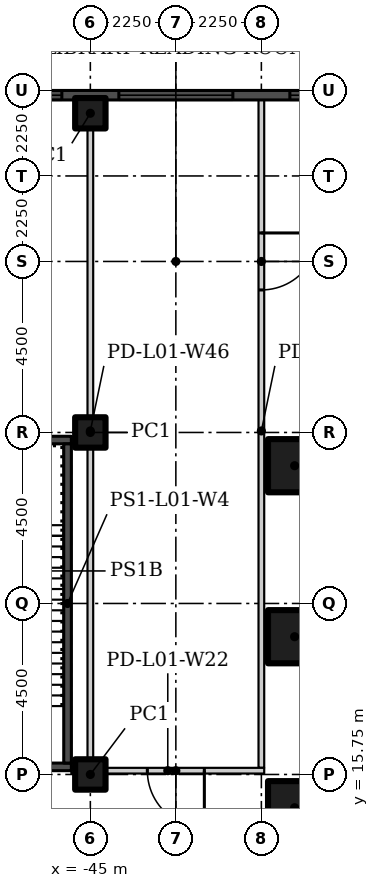
"""IFC4 building model, lengths in metres.
Left out: names, types, materials, properties, quantities, classifications, styles, units other than length and angle.
Written with IfcOpenShell. Run it as: python <this file> out.ifc"""

import sys

from ifc_helpers import new_model, si_unit, direction, frame, frame_2d, origin, origin_2d, place, context, subcontext, project, spatial, rectangle, hollow_rectangle, extrude, element, fill, save


model = new_model("IFC4")
c1 = context("Model", 3, precision=1e-05, world=origin(), true_north=direction((0.0, 1.0)))
c2 = subcontext(c1, "Body", "Model", "MODEL_VIEW")
j1 = project(units=[si_unit("LENGTHUNIT", "METRE"), si_unit("PLANEANGLEUNIT", "RADIAN")], contexts=[c1])
p1 = place(None, origin())
s1 = spatial("IfcSite", under=j1, at=p1, CompositionType="ELEMENT")
p2 = place(p1, origin())
s2 = spatial("IfcBuilding", under=s1, at=p2, CompositionType="ELEMENT")
p3 = place(p2, frame((0.0, 0.0, 6.5)))
s3 = spatial("IfcBuildingStorey", under=s2, at=p3, CompositionType="ELEMENT", Elevation=6.5)
for number, where in (
    (1, (-39.625, 14.875, 0.0)),
    (2, (-39.625, 19.375, 0.0)),
    (3, (-39.625, 23.875, 0.0)),
):
    element("IfcColumn", number, at=place(p3, frame(where)), inside=s3, PredefinedType="COLUMN", context=c2, shape_type="SweptSolid", body=[
        extrude(hollow_rectangle(XDim=1.4, YDim=1.4, WallThickness=0.06, at=origin_2d()), origin(), (0.0, 0.0, 1.0), 5.6),
    ])
for number, where in (
    (4, (-45.0, 15.75, 0.0)),
    (5, (-45.0, 24.75, 0.0)),
    (6, (-45.0, 33.15, 0.0)),
):
    element("IfcColumn", number, at=place(p3, frame(where)), inside=s3, PredefinedType="COLUMN", context=c2, shape_type="SweptSolid", body=[
        extrude(hollow_rectangle(XDim=0.8, YDim=0.8, WallThickness=0.03, at=origin_2d()), origin(), (0.0, 0.0, 1.0), 5.6),
    ])
p4 = place(p3, frame((-40.5, 33.655, 0.0), z_axis=(0.0, 0.0, 1.0), x_axis=(0.0, -1.0, 0.0)))
e7 = element("IfcWall", 7, at=p4, inside=s3, PredefinedType="PARTITIONING", context=c2, shape_type="SweptSolid", body=[
    extrude(rectangle(XDim=17.73, YDim=0.15, at=frame_2d((8.865, 0.0))), origin(), (0.0, 0.0, 1.0), 5.6),
])
p5 = place(p4, frame((3.655, 0.0, 0.0)))
e8 = element("IfcOpeningElement", 8, at=p5, cuts=e7, PredefinedType="OPENING", context=c2, shape_type="SweptSolid", body=[
    extrude(rectangle(XDim=1.5, YDim=2.1, at=frame_2d((0.75, 1.05))), frame((0.0, 0.085, 0.0), z_axis=(0.0, -1.0, 0.0), x_axis=(1.0, 0.0, 0.0)), (0.0, 0.0, 1.0), 0.17),
])
p6 = place(p3, frame((-40.425, 15.85, 0.0), z_axis=(0.0, 0.0, 1.0), x_axis=(-1.0, 0.0, 0.0)))
e9 = element("IfcWall", 9, at=p6, inside=s3, PredefinedType="PARTITIONING", context=c2, shape_type="SweptSolid", body=[
    extrude(rectangle(XDim=5.075, YDim=0.15, at=frame_2d((2.538, 0.0))), origin(), (0.0, 0.0, 1.0), 5.6),
])
p7 = place(p6, frame((1.575, 0.0, 0.0)))
e10 = element("IfcOpeningElement", 10, at=p7, cuts=e9, PredefinedType="OPENING", context=c2, shape_type="SweptSolid", body=[
    extrude(rectangle(XDim=1.5, YDim=2.1, at=frame_2d((0.75, 1.05))), frame((0.0, 0.085, 0.0), z_axis=(0.0, -1.0, 0.0), x_axis=(1.0, 0.0, 0.0)), (0.0, 0.0, 1.0), 0.17),
])
p8 = place(p3, frame((-45.0, 15.925, 0.0), z_axis=(0.0, 0.0, 1.0), x_axis=(0.0, 1.0, 0.0)))
e11 = element("IfcWall", 11, at=p8, inside=s3, PredefinedType="PARTITIONING", context=c2, shape_type="SweptSolid", body=[
    extrude(rectangle(XDim=17.73, YDim=0.15, at=frame_2d((8.865, 0.0))), origin(), (0.0, 0.0, 1.0), 5.6),
])
p9 = place(p3, frame((-67.5, 33.625, -0.35)))
e12 = element("IfcWall", 12, at=p9, inside=s3, PredefinedType="SOLIDWALL", context=c2, shape_type="SweptSolid", body=[
    extrude(rectangle(XDim=130.5, YDim=0.25, at=frame_2d((65.25, 0.0))), origin(), (0.0, 0.0, 1.0), 6.0),
])
p10 = place(p9, frame((126.75, 0.0, 1.35)))
e13 = element("IfcOpeningElement", 13, at=p10, cuts=e12, PredefinedType="OPENING", context=c2, shape_type="SweptSolid", body=[
    extrude(rectangle(XDim=3.0, YDim=1.8, at=frame_2d((1.5, 0.9))), frame((0.0, 0.135, 0.0), z_axis=(0.0, -1.0, 0.0), x_axis=(1.0, 0.0, 0.0)), (0.0, 0.0, 1.0), 0.27),
])
p11 = place(p9, frame((122.25, 0.0, 1.35)))
e14 = element("IfcOpeningElement", 14, at=p11, cuts=e12, PredefinedType="OPENING", context=c2, shape_type="SweptSolid", body=[
    extrude(rectangle(XDim=3.0, YDim=1.8, at=frame_2d((1.5, 0.9))), frame((0.0, 0.135, 0.0), z_axis=(0.0, -1.0, 0.0), x_axis=(1.0, 0.0, 0.0)), (0.0, 0.0, 1.0), 0.27),
])
p12 = place(p9, frame((117.75, 0.0, 1.35)))
e15 = element("IfcOpeningElement", 15, at=p12, cuts=e12, PredefinedType="OPENING", context=c2, shape_type="SweptSolid", body=[
    extrude(rectangle(XDim=3.0, YDim=1.8, at=frame_2d((1.5, 0.9))), frame((0.0, 0.135, 0.0), z_axis=(0.0, -1.0, 0.0), x_axis=(1.0, 0.0, 0.0)), (0.0, 0.0, 1.0), 0.27),
])
p13 = place(p9, frame((113.25, 0.0, 1.35)))
e16 = element("IfcOpeningElement", 16, at=p13, cuts=e12, PredefinedType="OPENING", context=c2, shape_type="SweptSolid", body=[
    extrude(rectangle(XDim=3.0, YDim=1.8, at=frame_2d((1.5, 0.9))), frame((0.0, 0.135, 0.0), z_axis=(0.0, -1.0, 0.0), x_axis=(1.0, 0.0, 0.0)), (0.0, 0.0, 1.0), 0.27),
])
p14 = place(p9, frame((108.75, 0.0, 1.35)))
e17 = element("IfcOpeningElement", 17, at=p14, cuts=e12, PredefinedType="OPENING", context=c2, shape_type="SweptSolid", body=[
    extrude(rectangle(XDim=3.0, YDim=1.8, at=frame_2d((1.5, 0.9))), frame((0.0, 0.135, 0.0), z_axis=(0.0, -1.0, 0.0), x_axis=(1.0, 0.0, 0.0)), (0.0, 0.0, 1.0), 0.27),
])
p15 = place(p9, frame((104.25, 0.0, 1.35)))
e18 = element("IfcOpeningElement", 18, at=p15, cuts=e12, PredefinedType="OPENING", context=c2, shape_type="SweptSolid", body=[
    extrude(rectangle(XDim=3.0, YDim=1.8, at=frame_2d((1.5, 0.9))), frame((0.0, 0.135, 0.0), z_axis=(0.0, -1.0, 0.0), x_axis=(1.0, 0.0, 0.0)), (0.0, 0.0, 1.0), 0.27),
])
p16 = place(p9, frame((99.75, 0.0, 1.35)))
e19 = element("IfcOpeningElement", 19, at=p16, cuts=e12, PredefinedType="OPENING", context=c2, shape_type="SweptSolid", body=[
    extrude(rectangle(XDim=3.0, YDim=1.8, at=frame_2d((1.5, 0.9))), frame((0.0, 0.135, 0.0), z_axis=(0.0, -1.0, 0.0), x_axis=(1.0, 0.0, 0.0)), (0.0, 0.0, 1.0), 0.27),
])
p17 = place(p9, frame((95.25, 0.0, 1.35)))
e20 = element("IfcOpeningElement", 20, at=p17, cuts=e12, PredefinedType="OPENING", context=c2, shape_type="SweptSolid", body=[
    extrude(rectangle(XDim=3.0, YDim=1.8, at=frame_2d((1.5, 0.9))), frame((0.0, 0.135, 0.0), z_axis=(0.0, -1.0, 0.0), x_axis=(1.0, 0.0, 0.0)), (0.0, 0.0, 1.0), 0.27),
])
p18 = place(p9, frame((90.75, 0.0, 1.35)))
e21 = element("IfcOpeningElement", 21, at=p18, cuts=e12, PredefinedType="OPENING", context=c2, shape_type="SweptSolid", body=[
    extrude(rectangle(XDim=3.0, YDim=1.8, at=frame_2d((1.5, 0.9))), frame((0.0, 0.135, 0.0), z_axis=(0.0, -1.0, 0.0), x_axis=(1.0, 0.0, 0.0)), (0.0, 0.0, 1.0), 0.27),
])
p19 = place(p9, frame((86.25, 0.0, 1.35)))
e22 = element("IfcOpeningElement", 22, at=p19, cuts=e12, PredefinedType="OPENING", context=c2, shape_type="SweptSolid", body=[
    extrude(rectangle(XDim=3.0, YDim=1.8, at=frame_2d((1.5, 0.9))), frame((0.0, 0.135, 0.0), z_axis=(0.0, -1.0, 0.0), x_axis=(1.0, 0.0, 0.0)), (0.0, 0.0, 1.0), 0.27),
])
p20 = place(p9, frame((81.75, 0.0, 1.35)))
e23 = element("IfcOpeningElement", 23, at=p20, cuts=e12, PredefinedType="OPENING", context=c2, shape_type="SweptSolid", body=[
    extrude(rectangle(XDim=3.0, YDim=1.8, at=frame_2d((1.5, 0.9))), frame((0.0, 0.135, 0.0), z_axis=(0.0, -1.0, 0.0), x_axis=(1.0, 0.0, 0.0)), (0.0, 0.0, 1.0), 0.27),
])
p21 = place(p9, frame((77.25, 0.0, 1.35)))
e24 = element("IfcOpeningElement", 24, at=p21, cuts=e12, PredefinedType="OPENING", context=c2, shape_type="SweptSolid", body=[
    extrude(rectangle(XDim=3.0, YDim=1.8, at=frame_2d((1.5, 0.9))), frame((0.0, 0.135, 0.0), z_axis=(0.0, -1.0, 0.0), x_axis=(1.0, 0.0, 0.0)), (0.0, 0.0, 1.0), 0.27),
])
p22 = place(p9, frame((72.75, 0.0, 1.35)))
e25 = element("IfcOpeningElement", 25, at=p22, cuts=e12, PredefinedType="OPENING", context=c2, shape_type="SweptSolid", body=[
    extrude(rectangle(XDim=3.0, YDim=1.8, at=frame_2d((1.5, 0.9))), frame((0.0, 0.135, 0.0), z_axis=(0.0, -1.0, 0.0), x_axis=(1.0, 0.0, 0.0)), (0.0, 0.0, 1.0), 0.27),
])
p23 = place(p9, frame((68.25, 0.0, 1.35)))
e26 = element("IfcOpeningElement", 26, at=p23, cuts=e12, PredefinedType="OPENING", context=c2, shape_type="SweptSolid", body=[
    extrude(rectangle(XDim=3.0, YDim=1.8, at=frame_2d((1.5, 0.9))), frame((0.0, 0.135, 0.0), z_axis=(0.0, -1.0, 0.0), x_axis=(1.0, 0.0, 0.0)), (0.0, 0.0, 1.0), 0.27),
])
p24 = place(p9, frame((63.75, 0.0, 1.35)))
e27 = element("IfcOpeningElement", 27, at=p24, cuts=e12, PredefinedType="OPENING", context=c2, shape_type="SweptSolid", body=[
    extrude(rectangle(XDim=3.0, YDim=1.8, at=frame_2d((1.5, 0.9))), frame((0.0, 0.135, 0.0), z_axis=(0.0, -1.0, 0.0), x_axis=(1.0, 0.0, 0.0)), (0.0, 0.0, 1.0), 0.27),
])
p25 = place(p9, frame((59.25, 0.0, 1.35)))
e28 = element("IfcOpeningElement", 28, at=p25, cuts=e12, PredefinedType="OPENING", context=c2, shape_type="SweptSolid", body=[
    extrude(rectangle(XDim=3.0, YDim=1.8, at=frame_2d((1.5, 0.9))), frame((0.0, 0.135, 0.0), z_axis=(0.0, -1.0, 0.0), x_axis=(1.0, 0.0, 0.0)), (0.0, 0.0, 1.0), 0.27),
])
p26 = place(p9, frame((54.75, 0.0, 1.35)))
e29 = element("IfcOpeningElement", 29, at=p26, cuts=e12, PredefinedType="OPENING", context=c2, shape_type="SweptSolid", body=[
    extrude(rectangle(XDim=3.0, YDim=1.8, at=frame_2d((1.5, 0.9))), frame((0.0, 0.135, 0.0), z_axis=(0.0, -1.0, 0.0), x_axis=(1.0, 0.0, 0.0)), (0.0, 0.0, 1.0), 0.27),
])
p27 = place(p9, frame((50.25, 0.0, 1.35)))
e30 = element("IfcOpeningElement", 30, at=p27, cuts=e12, PredefinedType="OPENING", context=c2, shape_type="SweptSolid", body=[
    extrude(rectangle(XDim=3.0, YDim=1.8, at=frame_2d((1.5, 0.9))), frame((0.0, 0.135, 0.0), z_axis=(0.0, -1.0, 0.0), x_axis=(1.0, 0.0, 0.0)), (0.0, 0.0, 1.0), 0.27),
])
p28 = place(p9, frame((45.75, 0.0, 1.35)))
e31 = element("IfcOpeningElement", 31, at=p28, cuts=e12, PredefinedType="OPENING", context=c2, shape_type="SweptSolid", body=[
    extrude(rectangle(XDim=3.0, YDim=1.8, at=frame_2d((1.5, 0.9))), frame((0.0, 0.135, 0.0), z_axis=(0.0, -1.0, 0.0), x_axis=(1.0, 0.0, 0.0)), (0.0, 0.0, 1.0), 0.27),
])
p29 = place(p9, frame((41.25, 0.0, 1.35)))
e32 = element("IfcOpeningElement", 32, at=p29, cuts=e12, PredefinedType="OPENING", context=c2, shape_type="SweptSolid", body=[
    extrude(rectangle(XDim=3.0, YDim=1.8, at=frame_2d((1.5, 0.9))), frame((0.0, 0.135, 0.0), z_axis=(0.0, -1.0, 0.0), x_axis=(1.0, 0.0, 0.0)), (0.0, 0.0, 1.0), 0.27),
])
p30 = place(p9, frame((36.75, 0.0, 1.35)))
e33 = element("IfcOpeningElement", 33, at=p30, cuts=e12, PredefinedType="OPENING", context=c2, shape_type="SweptSolid", body=[
    extrude(rectangle(XDim=3.0, YDim=1.8, at=frame_2d((1.5, 0.9))), frame((0.0, 0.135, 0.0), z_axis=(0.0, -1.0, 0.0), x_axis=(1.0, 0.0, 0.0)), (0.0, 0.0, 1.0), 0.27),
])
p31 = place(p9, frame((32.25, 0.0, 1.35)))
e34 = element("IfcOpeningElement", 34, at=p31, cuts=e12, PredefinedType="OPENING", context=c2, shape_type="SweptSolid", body=[
    extrude(rectangle(XDim=3.0, YDim=1.8, at=frame_2d((1.5, 0.9))), frame((0.0, 0.135, 0.0), z_axis=(0.0, -1.0, 0.0), x_axis=(1.0, 0.0, 0.0)), (0.0, 0.0, 1.0), 0.27),
])
p32 = place(p9, frame((27.75, 0.0, 1.35)))
e35 = element("IfcOpeningElement", 35, at=p32, cuts=e12, PredefinedType="OPENING", context=c2, shape_type="SweptSolid", body=[
    extrude(rectangle(XDim=3.0, YDim=1.8, at=frame_2d((1.5, 0.9))), frame((0.0, 0.135, 0.0), z_axis=(0.0, -1.0, 0.0), x_axis=(1.0, 0.0, 0.0)), (0.0, 0.0, 1.0), 0.27),
])
p33 = place(p9, frame((23.25, 0.0, 1.35)))
e36 = element("IfcOpeningElement", 36, at=p33, cuts=e12, PredefinedType="OPENING", context=c2, shape_type="SweptSolid", body=[
    extrude(rectangle(XDim=3.0, YDim=1.8, at=frame_2d((1.5, 0.9))), frame((0.0, 0.135, 0.0), z_axis=(0.0, -1.0, 0.0), x_axis=(1.0, 0.0, 0.0)), (0.0, 0.0, 1.0), 0.27),
])
p34 = place(p9, frame((18.75, 0.0, 1.35)))
e37 = element("IfcOpeningElement", 37, at=p34, cuts=e12, PredefinedType="OPENING", context=c2, shape_type="SweptSolid", body=[
    extrude(rectangle(XDim=3.0, YDim=1.8, at=frame_2d((1.5, 0.9))), frame((0.0, 0.135, 0.0), z_axis=(0.0, -1.0, 0.0), x_axis=(1.0, 0.0, 0.0)), (0.0, 0.0, 1.0), 0.27),
])
p35 = place(p9, frame((14.25, 0.0, 1.35)))
e38 = element("IfcOpeningElement", 38, at=p35, cuts=e12, PredefinedType="OPENING", context=c2, shape_type="SweptSolid", body=[
    extrude(rectangle(XDim=3.0, YDim=1.8, at=frame_2d((1.5, 0.9))), frame((0.0, 0.135, 0.0), z_axis=(0.0, -1.0, 0.0), x_axis=(1.0, 0.0, 0.0)), (0.0, 0.0, 1.0), 0.27),
])
p36 = place(p9, frame((9.75, 0.0, 1.35)))
e39 = element("IfcOpeningElement", 39, at=p36, cuts=e12, PredefinedType="OPENING", context=c2, shape_type="SweptSolid", body=[
    extrude(rectangle(XDim=3.0, YDim=1.8, at=frame_2d((1.5, 0.9))), frame((0.0, 0.135, 0.0), z_axis=(0.0, -1.0, 0.0), x_axis=(1.0, 0.0, 0.0)), (0.0, 0.0, 1.0), 0.27),
])
p37 = place(p9, frame((5.25, 0.0, 1.35)))
e40 = element("IfcOpeningElement", 40, at=p37, cuts=e12, PredefinedType="OPENING", context=c2, shape_type="SweptSolid", body=[
    extrude(rectangle(XDim=3.0, YDim=1.8, at=frame_2d((1.5, 0.9))), frame((0.0, 0.135, 0.0), z_axis=(0.0, -1.0, 0.0), x_axis=(1.0, 0.0, 0.0)), (0.0, 0.0, 1.0), 0.27),
])
p38 = place(p9, frame((0.75, 0.0, 1.35)))
e41 = element("IfcOpeningElement", 41, at=p38, cuts=e12, PredefinedType="OPENING", context=c2, shape_type="SweptSolid", body=[
    extrude(rectangle(XDim=3.0, YDim=1.8, at=frame_2d((1.5, 0.9))), frame((0.0, 0.135, 0.0), z_axis=(0.0, -1.0, 0.0), x_axis=(1.0, 0.0, 0.0)), (0.0, 0.0, 1.0), 0.27),
])
p39 = place(p3, frame((-53.5, 15.95, 0.0)))
e42 = element("IfcWall", 42, at=p39, inside=s3, PredefinedType="SHEAR", context=c2, shape_type="SweptSolid", body=[
    extrude(rectangle(XDim=8.0, YDim=0.2, at=frame_2d((4.0, 0.0))), origin(), (0.0, 0.0, 1.0), 5.6),
])
p40 = place(p39, frame((1.462, 0.0, 0.0)))
e43 = element("IfcOpeningElement", 43, at=p40, cuts=e42, PredefinedType="OPENING", context=c2, shape_type="SweptSolid", body=[
    extrude(rectangle(XDim=1.2, YDim=2.4, at=frame_2d((0.6, 1.2))), frame((0.0, 0.11, 0.0), z_axis=(0.0, -1.0, 0.0), x_axis=(1.0, 0.0, 0.0)), (0.0, 0.0, 1.0), 0.22),
])
p41 = place(p39, frame((5.337, 0.0, 0.0)))
e44 = element("IfcOpeningElement", 44, at=p41, cuts=e42, PredefinedType="OPENING", context=c2, shape_type="SweptSolid", body=[
    extrude(rectangle(XDim=1.2, YDim=2.4, at=frame_2d((0.6, 1.2))), frame((0.0, 0.11, 0.0), z_axis=(0.0, -1.0, 0.0), x_axis=(1.0, 0.0, 0.0)), (0.0, 0.0, 1.0), 0.22),
])
p42 = place(p3, frame((-53.5, 24.55, 0.0)))
e45 = element("IfcWall", 45, at=p42, inside=s3, PredefinedType="SHEAR", context=c2, shape_type="SweptSolid", body=[
    extrude(rectangle(XDim=8.0, YDim=0.2, at=frame_2d((4.0, 0.0))), origin(), (0.0, 0.0, 1.0), 5.6),
])
p43 = place(p3, frame((-45.6, 16.05, 0.0), z_axis=(0.0, 0.0, 1.0), x_axis=(0.0, 1.0, 0.0)))
e46 = element("IfcWall", 46, at=p43, inside=s3, PredefinedType="SHEAR", context=c2, shape_type="SweptSolid", body=[
    extrude(rectangle(XDim=8.4, YDim=0.2, at=frame_2d((4.2, 0.0))), origin(), (0.0, 0.0, 1.0), 5.6),
])
p44 = place(p7, origin())
e47 = element("IfcDoor", 47, at=p44, inside=s3, OperationType="DOUBLE_DOOR_SINGLE_SWING", PredefinedType="DOOR", context=c2, shape_type="SweptSolid", body=[
    extrude(rectangle(XDim=1.5, YDim=2.1, at=frame_2d((0.75, 1.05))), frame((0.0, 0.025, 0.0), z_axis=(0.0, -1.0, 0.0), x_axis=(1.0, 0.0, 0.0)), (0.0, 0.0, 1.0), 0.05),
])
fill(e10, e47)
p45 = place(p5, origin())
e48 = element("IfcDoor", 48, at=p45, inside=s3, OperationType="DOUBLE_DOOR_SINGLE_SWING", PredefinedType="DOOR", context=c2, shape_type="SweptSolid", body=[
    extrude(rectangle(XDim=1.5, YDim=2.1, at=frame_2d((0.75, 1.05))), frame((0.0, 0.025, 0.0), z_axis=(0.0, -1.0, 0.0), x_axis=(1.0, 0.0, 0.0)), (0.0, 0.0, 1.0), 0.05),
])
fill(e8, e48)
p46 = place(p32, origin())
e49 = element("IfcWindow", 49, at=p46, inside=s3, PartitioningType="TRIPLE_PANEL_VERTICAL", PredefinedType="WINDOW", context=c2, shape_type="SweptSolid", body=[
    extrude(rectangle(XDim=3.0, YDim=1.8, at=frame_2d((1.5, 0.9))), frame((0.0, 0.03, 0.0), z_axis=(0.0, -1.0, 0.0), x_axis=(1.0, 0.0, 0.0)), (0.0, 0.0, 1.0), 0.06),
])
fill(e35, e49)
p47 = place(p33, origin())
e50 = element("IfcWindow", 50, at=p47, inside=s3, PartitioningType="TRIPLE_PANEL_VERTICAL", PredefinedType="WINDOW", context=c2, shape_type="SweptSolid", body=[
    extrude(rectangle(XDim=3.0, YDim=1.8, at=frame_2d((1.5, 0.9))), frame((0.0, 0.03, 0.0), z_axis=(0.0, -1.0, 0.0), x_axis=(1.0, 0.0, 0.0)), (0.0, 0.0, 1.0), 0.06),
])
fill(e36, e50)
p48 = place(p34, origin())
e51 = element("IfcWindow", 51, at=p48, inside=s3, PartitioningType="TRIPLE_PANEL_VERTICAL", PredefinedType="WINDOW", context=c2, shape_type="SweptSolid", body=[
    extrude(rectangle(XDim=3.0, YDim=1.8, at=frame_2d((1.5, 0.9))), frame((0.0, 0.03, 0.0), z_axis=(0.0, -1.0, 0.0), x_axis=(1.0, 0.0, 0.0)), (0.0, 0.0, 1.0), 0.06),
])
fill(e37, e51)
save(model, sys.argv[1])
